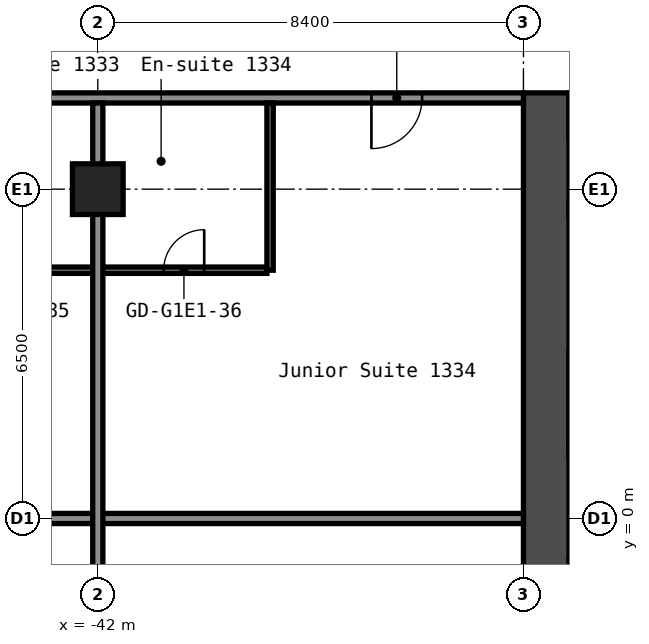
"""IFC4 building model, lengths in metres.
Left out: names, types, materials, properties, quantities, classifications, styles, units other than length and angle.
Written with IfcOpenShell. Run it as: python <this file> out.ifc"""

import sys

from ifc_helpers import new_model, si_unit, direction, frame, frame_2d, origin, origin_2d, place, context, subcontext, project, spatial, rectangle, hollow_rectangle, extrude, element, fill, save


model = new_model("IFC4")
c1 = context("Model", 3, precision=1e-05, world=origin(), true_north=direction((0.0, 1.0)))
c2 = subcontext(c1, "Body", "Model", "MODEL_VIEW")
j1 = project(units=[si_unit("LENGTHUNIT", "METRE"), si_unit("PLANEANGLEUNIT", "RADIAN")], contexts=[c1])
p1 = place(None, origin())
s1 = spatial("IfcSite", under=j1, at=p1, CompositionType="ELEMENT")
p2 = place(p1, origin())
s2 = spatial("IfcBuilding", under=s1, at=p2, CompositionType="ELEMENT")
p3 = place(p2, frame((0.0, 0.0, 48.6)))
s3 = spatial("IfcBuildingStorey", under=s2, at=p3, CompositionType="ELEMENT", Elevation=48.6)
p4 = place(p3, frame((-42.0, 6.5, 0.0), z_axis=(0.0, 0.0, 1.0), x_axis=(1.0, 0.0, 0.0)))
e1 = element("IfcColumn", 1, at=p4, inside=s3, PredefinedType="COLUMN", context=c2, shape_type="SweptSolid", body=[
    extrude(hollow_rectangle(XDim=1.0, YDim=1.0, WallThickness=0.04, at=origin_2d()), origin(), (0.0, 0.0, 1.0), 2.8),
])
p5 = place(p3, frame((-33.15, -8.4, 0.0), z_axis=(0.0, 0.0, 1.0), x_axis=(0.0, 1.0, 0.0)))
e2 = element("IfcWall", 2, at=p5, inside=s3, PredefinedType="SHEAR", context=c2, shape_type="SweptSolid", body=[
    extrude(rectangle(XDim=16.8, YDim=0.9, at=frame_2d((8.4, 0.0))), origin(), (0.0, 0.0, 1.0), 2.8),
])
p6 = place(p3, frame((-32.7, 1.325, 0.0), z_axis=(0.0, 0.0, 1.0), x_axis=(1.0, 0.0, 0.0)))
e3 = element("IfcWall", 3, at=p6, inside=s3, PredefinedType="SHEAR", context=c2, shape_type="SweptSolid", body=[
    extrude(rectangle(XDim=5.05, YDim=0.25, at=frame_2d((2.525, 0.0))), origin(), (0.0, 0.0, 1.0), 2.8),
])
p7 = place(p6, frame((3.3, 0.0, 0.0)))
e4 = element("IfcOpeningElement", 4, at=p7, cuts=e3, PredefinedType="OPENING", context=c2, shape_type="SweptSolid", body=[
    extrude(rectangle(XDim=1.2, YDim=2.1, at=frame_2d((0.6, 1.05))), frame((0.0, 0.135, 0.0), z_axis=(0.0, -1.0, 0.0), x_axis=(1.0, 0.0, 0.0)), (0.0, 0.0, 1.0), 0.27),
])
p8 = place(p3, frame((-32.7, -0.875, 0.0), z_axis=(0.0, 0.0, 1.0), x_axis=(1.0, 0.0, 0.0)))
e5 = element("IfcWall", 5, at=p8, inside=s3, PredefinedType="PARTITIONING", context=c2, shape_type="SweptSolid", body=[
    extrude(rectangle(XDim=2.3, YDim=0.15, at=frame_2d((1.15, 0.0))), origin(), (0.0, 0.0, 1.0), 2.8),
])
p9 = place(p3, frame((-48.5, 0.0, 0.0), z_axis=(0.0, 0.0, 1.0), x_axis=(1.0, 0.0, 0.0)))
e6 = element("IfcWall", 6, at=p9, inside=s3, PredefinedType="PARTITIONING", context=c2, shape_type="SweptSolid", body=[
    extrude(rectangle(XDim=14.9, YDim=0.2, at=frame_2d((7.45, 0.0))), origin(), (0.0, 0.0, 1.0), 2.8),
])
p10 = place(p3, frame((-45.337, 4.9, 0.0), z_axis=(0.0, 0.0, 1.0), x_axis=(1.0, 0.0, 0.0)))
e7 = element("IfcWall", 7, at=p10, inside=s3, PredefinedType="PARTITIONING", context=c2, shape_type="SweptSolid", body=[
    extrude(rectangle(XDim=6.675, YDim=0.125, at=frame_2d((3.337, 0.0))), origin(), (0.0, 0.0, 1.0), 2.8),
])
p11 = place(p10, frame((1.238, 0.0, 0.0)))
e8 = element("IfcOpeningElement", 8, at=p11, cuts=e7, PredefinedType="OPENING", context=c2, shape_type="SweptSolid", body=[
    extrude(rectangle(XDim=0.8, YDim=2.1, at=frame_2d((0.4, 1.05))), frame((0.0, 0.073, 0.0), z_axis=(0.0, -1.0, 0.0), x_axis=(1.0, 0.0, 0.0)), (0.0, 0.0, 1.0), 0.145),
])
p12 = place(p10, frame((4.637, 0.0, 0.0)))
e9 = element("IfcOpeningElement", 9, at=p12, cuts=e7, PredefinedType="OPENING", context=c2, shape_type="SweptSolid", body=[
    extrude(rectangle(XDim=0.8, YDim=2.1, at=frame_2d((0.4, 1.05))), frame((0.0, 0.073, 0.0), z_axis=(0.0, -1.0, 0.0), x_axis=(1.0, 0.0, 0.0)), (0.0, 0.0, 1.0), 0.145),
])
p13 = place(p3, frame((-48.6, 8.3, 0.0), z_axis=(0.0, 0.0, 1.0), x_axis=(1.0, 0.0, 0.0)))
e10 = element("IfcWall", 10, at=p13, inside=s3, PredefinedType="PARTITIONING", context=c2, shape_type="SweptSolid", body=[
    extrude(rectangle(XDim=15.0, YDim=0.2, at=frame_2d((7.5, 0.0))), origin(), (0.0, 0.0, 1.0), 2.8),
])
p14 = place(p13, frame((1.1, 0.0, 0.0)))
e11 = element("IfcOpeningElement", 11, at=p14, cuts=e10, PredefinedType="OPENING", context=c2, shape_type="SweptSolid", body=[
    extrude(rectangle(XDim=1.0, YDim=2.1, at=frame_2d((0.5, 1.05))), frame((0.0, 0.11, 0.0), z_axis=(0.0, -1.0, 0.0), x_axis=(1.0, 0.0, 0.0)), (0.0, 0.0, 1.0), 0.22),
])
p15 = place(p13, frame((12.0, 0.0, 0.0)))
e12 = element("IfcOpeningElement", 12, at=p15, cuts=e10, PredefinedType="OPENING", context=c2, shape_type="SweptSolid", body=[
    extrude(rectangle(XDim=1.0, YDim=2.1, at=frame_2d((0.5, 1.05))), frame((0.0, 0.11, 0.0), z_axis=(0.0, -1.0, 0.0), x_axis=(1.0, 0.0, 0.0)), (0.0, 0.0, 1.0), 0.22),
])
p16 = place(p3, frame((-42.0, -8.2, 0.0), z_axis=(0.0, 0.0, 1.0), x_axis=(0.0, 1.0, 0.0)))
e13 = element("IfcWall", 13, at=p16, inside=s3, PredefinedType="PARTITIONING", context=c2, shape_type="SweptSolid", body=[
    extrude(rectangle(XDim=16.4, YDim=0.2, at=frame_2d((8.2, 0.0))), origin(), (0.0, 0.0, 1.0), 2.8),
])
p17 = place(p3, frame((-38.6, 4.9, 0.0), z_axis=(0.0, 0.0, 1.0), x_axis=(0.0, 1.0, 0.0)))
e14 = element("IfcWall", 14, at=p17, inside=s3, PredefinedType="PARTITIONING", context=c2, shape_type="SweptSolid", body=[
    extrude(rectangle(XDim=3.3, YDim=0.125, at=frame_2d((1.65, 0.0))), origin(), (0.0, 0.0, 1.0), 2.8),
])
p18 = place(p12, origin())
e15 = element("IfcDoor", 15, at=p18, inside=s3, OperationType="SINGLE_SWING_LEFT", PredefinedType="DOOR", context=c2, shape_type="SweptSolid", body=[
    extrude(rectangle(XDim=0.8, YDim=2.1, at=frame_2d((0.4, 1.05))), frame((0.0, 0.025, 0.0), z_axis=(0.0, -1.0, 0.0), x_axis=(1.0, 0.0, 0.0)), (0.0, 0.0, 1.0), 0.05),
])
fill(e9, e15)
p19 = place(p15, origin())
e16 = element("IfcDoor", 16, at=p19, inside=s3, OperationType="SINGLE_SWING_LEFT", PredefinedType="DOOR", context=c2, shape_type="SweptSolid", body=[
    extrude(rectangle(XDim=1.0, YDim=2.1, at=frame_2d((0.5, 1.05))), frame((0.0, 0.025, 0.0), z_axis=(0.0, -1.0, 0.0), x_axis=(1.0, 0.0, 0.0)), (0.0, 0.0, 1.0), 0.05),
])
fill(e12, e16)
save(model, sys.argv[1])
